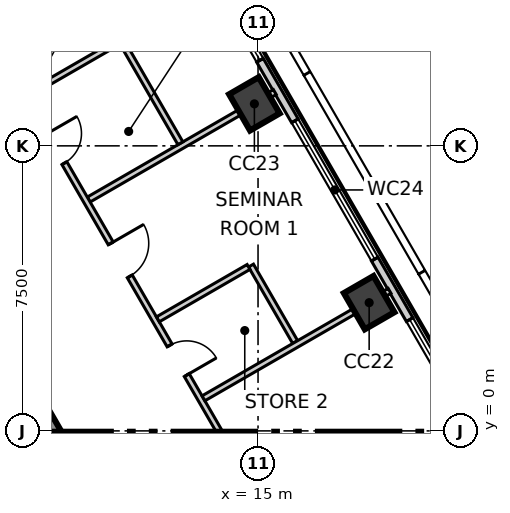
"""IFC4 building model, lengths in metres.
Left out: names, types, materials, properties, quantities, classifications, styles, units other than length and angle.
Written with IfcOpenShell. Run it as: python <this file> out.ifc"""

import sys

from ifc_helpers import new_model, si_unit, direction, frame, frame_2d, origin, origin_2d, place, context, subcontext, project, spatial, polyline, rectangle, outline, extrude, element, fill, save


model = new_model("IFC4")
c1 = context("Model", 3, precision=1e-05, world=origin(), true_north=direction((0.0, 1.0)))
c2 = subcontext(c1, "Body", "Model", "MODEL_VIEW")
j1 = project(units=[si_unit("LENGTHUNIT", "METRE"), si_unit("PLANEANGLEUNIT", "RADIAN")], contexts=[c1])
p1 = place(None, origin())
s1 = spatial("IfcSite", under=j1, at=p1, CompositionType="ELEMENT")
p2 = place(p1, origin())
s2 = spatial("IfcBuilding", under=s1, at=p2, CompositionType="ELEMENT")
p3 = place(p2, frame((0.0, 0.0, 215.3)))
s3 = spatial("IfcBuildingStorey", under=s2, at=p3, CompositionType="ELEMENT", Elevation=215.3)
p4 = place(p3, frame((12.413, -5.2, -0.3), z_axis=(0.0, 0.0, 1.0), x_axis=(-0.500011533395, 0.866018744874, 0.0)))
e1 = element("IfcWall", 1, at=p4, inside=s3, PredefinedType="SHEAR", context=c2, shape_type="SweptSolid", body=[
    extrude(outline(polyline([(-0.202, -0.35), (1.782, -0.35), (3.766, -0.35), (5.75, -0.35), (7.734, -0.35), (9.718, -0.35), (11.702, -0.35), (13.686, -0.35), (15.67, -0.35), (17.654, -0.35), (19.638, -0.35), (21.622, -0.35), (21.218, 0.35), (19.307, 0.35), (17.397, 0.35), (15.486, 0.35), (13.576, 0.35), (11.665, 0.35), (9.755, 0.35), (7.844, 0.35), (5.934, 0.35), (4.023, 0.35), (2.113, 0.35), (0.202, 0.35), (-0.202, -0.35)])), origin(), (0.0, 0.0, 1.0), 4.0),
])
p5 = place(p4, frame((4.055, 0.0, 0.3)))
e2 = element("IfcOpeningElement", 2, at=p5, cuts=e1, PredefinedType="OPENING", context=c2, shape_type="SweptSolid", body=[
    extrude(rectangle(XDim=0.9, YDim=2.1, at=frame_2d((0.45, 1.05))), frame((0.0, 0.36, 0.0), z_axis=(0.0, -1.0, 0.0), x_axis=(1.0, 0.0, 0.0)), (0.0, 0.0, 1.0), 0.72),
])
p6 = place(p4, frame((16.465, 0.0, 0.3)))
e3 = element("IfcOpeningElement", 3, at=p6, cuts=e1, PredefinedType="OPENING", context=c2, shape_type="SweptSolid", body=[
    extrude(rectangle(XDim=0.9, YDim=2.1, at=frame_2d((0.45, 1.05))), frame((0.0, 0.36, 0.0), z_axis=(0.0, -1.0, 0.0), x_axis=(1.0, 0.0, 0.0)), (0.0, 0.0, 1.0), 0.72),
])
for number, where, z_axis, x_axis in (
    (4, (17.924, 3.374, -0.3), (0.0, 0.0, 1.0), (-0.5, 0.866, 0.0)),
    (5, (14.904, 8.605, -0.3), (0.0, 0.0, 1.0), (-0.5, 0.866, 0.0)),
):
    element("IfcColumn", number, at=place(p3, frame(where, z_axis=z_axis, x_axis=x_axis)), inside=s3, PredefinedType="COLUMN", context=c2, shape_type="SweptSolid", body=[
        extrude(rectangle(XDim=1.1, YDim=0.9, at=origin_2d()), origin(), (0.0, 0.0, 1.0), 4.0),
    ])
p7 = place(p3, frame((28.243, -13.098, 0.0), z_axis=(0.0, 0.0, 1.0), x_axis=(-0.500001688958, 0.866024428662, 0.0)))
e6 = element("IfcWall", 6, at=p7, inside=s3, PredefinedType="ELEMENTEDWALL", context=c2, shape_type="SweptSolid", body=[
    extrude(rectangle(XDim=50.909, YDim=0.2, at=frame_2d((25.455, 0.0))), origin(), (0.0, 0.0, 1.0), 3.7),
])
p8 = place(p7, frame((2.223, 0.0, 0.9)))
e7 = element("IfcOpeningElement", 7, at=p8, cuts=e6, PredefinedType="OPENING", context=c2, shape_type="SweptSolid", body=[
    extrude(rectangle(XDim=4.2, YDim=2.5, at=frame_2d((2.1, 1.25))), frame((0.0, 0.11, 0.0), z_axis=(0.0, -1.0, 0.0), x_axis=(1.0, 0.0, 0.0)), (0.0, 0.0, 1.0), 0.22),
])
p9 = place(p7, frame((8.263, 0.0, 0.9)))
e8 = element("IfcOpeningElement", 8, at=p9, cuts=e6, PredefinedType="OPENING", context=c2, shape_type="SweptSolid", body=[
    extrude(rectangle(XDim=4.2, YDim=2.5, at=frame_2d((2.1, 1.25))), frame((0.0, 0.11, 0.0), z_axis=(0.0, -1.0, 0.0), x_axis=(1.0, 0.0, 0.0)), (0.0, 0.0, 1.0), 0.22),
])
p10 = place(p7, frame((14.304, 0.0, 0.9)))
e9 = element("IfcOpeningElement", 9, at=p10, cuts=e6, PredefinedType="OPENING", context=c2, shape_type="SweptSolid", body=[
    extrude(rectangle(XDim=4.2, YDim=2.5, at=frame_2d((2.1, 1.25))), frame((0.0, 0.11, 0.0), z_axis=(0.0, -1.0, 0.0), x_axis=(1.0, 0.0, 0.0)), (0.0, 0.0, 1.0), 0.22),
])
p11 = place(p7, frame((20.345, 0.0, 0.9)))
e10 = element("IfcOpeningElement", 10, at=p11, cuts=e6, PredefinedType="OPENING", context=c2, shape_type="SweptSolid", body=[
    extrude(rectangle(XDim=4.2, YDim=2.5, at=frame_2d((2.1, 1.25))), frame((0.0, 0.11, 0.0), z_axis=(0.0, -1.0, 0.0), x_axis=(1.0, 0.0, 0.0)), (0.0, 0.0, 1.0), 0.22),
])
p12 = place(p7, frame((26.385, 0.0, 0.9)))
e11 = element("IfcOpeningElement", 11, at=p12, cuts=e6, PredefinedType="OPENING", context=c2, shape_type="SweptSolid", body=[
    extrude(rectangle(XDim=4.2, YDim=2.5, at=frame_2d((2.1, 1.25))), frame((0.0, 0.11, 0.0), z_axis=(0.0, -1.0, 0.0), x_axis=(1.0, 0.0, 0.0)), (0.0, 0.0, 1.0), 0.22),
])
p13 = place(p7, frame((32.426, 0.0, 0.9)))
e12 = element("IfcOpeningElement", 12, at=p13, cuts=e6, PredefinedType="OPENING", context=c2, shape_type="SweptSolid", body=[
    extrude(rectangle(XDim=4.2, YDim=2.5, at=frame_2d((2.1, 1.25))), frame((0.0, 0.11, 0.0), z_axis=(0.0, -1.0, 0.0), x_axis=(1.0, 0.0, 0.0)), (0.0, 0.0, 1.0), 0.22),
])
p14 = place(p7, frame((38.466, 0.0, 0.9)))
e13 = element("IfcOpeningElement", 13, at=p14, cuts=e6, PredefinedType="OPENING", context=c2, shape_type="SweptSolid", body=[
    extrude(rectangle(XDim=4.2, YDim=2.5, at=frame_2d((2.1, 1.25))), frame((0.0, 0.11, 0.0), z_axis=(0.0, -1.0, 0.0), x_axis=(1.0, 0.0, 0.0)), (0.0, 0.0, 1.0), 0.22),
])
p15 = place(p7, frame((44.507, 0.0, 0.9)))
e14 = element("IfcOpeningElement", 14, at=p15, cuts=e6, PredefinedType="OPENING", context=c2, shape_type="SweptSolid", body=[
    extrude(rectangle(XDim=4.2, YDim=2.5, at=frame_2d((2.1, 1.25))), frame((0.0, 0.11, 0.0), z_axis=(0.0, -1.0, 0.0), x_axis=(1.0, 0.0, 0.0)), (0.0, 0.0, 1.0), 0.22),
])
p16 = place(p3, frame((10.544, 6.087, 0.0), z_axis=(0.0, 0.0, 1.0), x_axis=(0.865959810878, 0.500113593041, 0.0)))
e15 = element("IfcWall", 15, at=p16, inside=s3, PredefinedType="PARTITIONING", context=c2, shape_type="SweptSolid", body=[
    extrude(rectangle(XDim=5.655, YDim=0.15, at=frame_2d((2.828, 0.0))), origin(), (0.0, 0.0, 1.0), 3.2),
])
p17 = place(p3, frame((0.075, 24.07, 0.0), z_axis=(0.0, 0.0, 1.0), x_axis=(0.500006834213, -0.866021458014, 0.0)))
e16 = element("IfcWall", 16, at=p17, inside=s3, PredefinedType="PARTITIONING", context=c2, shape_type="SweptSolid", body=[
    extrude(rectangle(XDim=41.616, YDim=0.15, at=frame_2d((20.808, 0.0))), origin(), (0.0, 0.0, 1.0), 3.7),
])
p18 = place(p17, frame((33.715, 0.0, 0.0)))
e17 = element("IfcOpeningElement", 17, at=p18, cuts=e16, PredefinedType="OPENING", context=c2, shape_type="SweptSolid", body=[
    extrude(rectangle(XDim=1.1, YDim=2.1, at=frame_2d((0.55, 1.05))), frame((0.0, 0.085, 0.0), z_axis=(0.0, -1.0, 0.0), x_axis=(1.0, 0.0, 0.0)), (0.0, 0.0, 1.0), 0.17),
])
p19 = place(p17, frame((22.098, 0.0, 0.0)))
e18 = element("IfcOpeningElement", 18, at=p19, cuts=e16, PredefinedType="OPENING", context=c2, shape_type="SweptSolid", body=[
    extrude(rectangle(XDim=1.0, YDim=2.1, at=frame_2d((0.5, 1.05))), frame((0.0, 0.085, 0.0), z_axis=(0.0, -1.0, 0.0), x_axis=(1.0, 0.0, 0.0)), (0.0, 0.0, 1.0), 0.17),
])
p20 = place(p17, frame((25.198, 0.0, 0.0)))
e19 = element("IfcOpeningElement", 19, at=p20, cuts=e16, PredefinedType="OPENING", context=c2, shape_type="SweptSolid", body=[
    extrude(rectangle(XDim=0.9, YDim=2.1, at=frame_2d((0.45, 1.05))), frame((0.0, 0.085, 0.0), z_axis=(0.0, -1.0, 0.0), x_axis=(1.0, 0.0, 0.0)), (0.0, 0.0, 1.0), 0.17),
])
p21 = place(p17, frame((9.858, 0.0, 0.0)))
e20 = element("IfcOpeningElement", 20, at=p21, cuts=e16, PredefinedType="OPENING", context=c2, shape_type="SweptSolid", body=[
    extrude(rectangle(XDim=1.1, YDim=2.1, at=frame_2d((0.55, 1.05))), frame((0.0, 0.085, 0.0), z_axis=(0.0, -1.0, 0.0), x_axis=(1.0, 0.0, 0.0)), (0.0, 0.0, 1.0), 0.17),
])
p22 = place(p17, frame((18.758, 0.0, 0.0)))
e21 = element("IfcOpeningElement", 21, at=p22, cuts=e16, PredefinedType="OPENING", context=c2, shape_type="SweptSolid", body=[
    extrude(rectangle(XDim=0.9, YDim=2.1, at=frame_2d((0.45, 1.05))), frame((0.0, 0.085, 0.0), z_axis=(0.0, -1.0, 0.0), x_axis=(1.0, 0.0, 0.0)), (0.0, 0.0, 1.0), 0.17),
])
p23 = place(p17, frame((15.558, 0.0, 0.0)))
e22 = element("IfcOpeningElement", 22, at=p23, cuts=e16, PredefinedType="OPENING", context=c2, shape_type="SweptSolid", body=[
    extrude(rectangle(XDim=0.9, YDim=2.1, at=frame_2d((0.45, 1.05))), frame((0.0, 0.085, 0.0), z_axis=(0.0, -1.0, 0.0), x_axis=(1.0, 0.0, 0.0)), (0.0, 0.0, 1.0), 0.17),
])
p24 = place(p17, frame((12.658, 0.0, 0.0)))
e23 = element("IfcOpeningElement", 23, at=p24, cuts=e16, PredefinedType="OPENING", context=c2, shape_type="SweptSolid", body=[
    extrude(rectangle(XDim=1.0, YDim=2.1, at=frame_2d((0.5, 1.05))), frame((0.0, 0.085, 0.0), z_axis=(0.0, -1.0, 0.0), x_axis=(1.0, 0.0, 0.0)), (0.0, 0.0, 1.0), 0.17),
])
p25 = place(p17, frame((3.776, 0.0, 0.0)))
e24 = element("IfcOpeningElement", 24, at=p25, cuts=e16, PredefinedType="OPENING", context=c2, shape_type="SweptSolid", body=[
    extrude(rectangle(XDim=1.1, YDim=2.1, at=frame_2d((0.55, 1.05))), frame((0.0, 0.085, 0.0), z_axis=(0.0, -1.0, 0.0), x_axis=(1.0, 0.0, 0.0)), (0.0, 0.0, 1.0), 0.17),
])
p26 = place(p3, frame((8.595, 15.124, 0.0), z_axis=(0.0, 0.0, 1.0), x_axis=(0.499970334739, -0.866042530354, 0.0)))
e25 = element("IfcWall", 25, at=p26, inside=s3, PredefinedType="PARTITIONING", context=c2, shape_type="SweptSolid", body=[
    extrude(rectangle(XDim=8.725, YDim=0.15, at=frame_2d((4.362, 0.0))), origin(), (0.0, 0.0, 1.0), 3.7),
])
p27 = place(p3, frame((14.815, 4.35, 0.0), z_axis=(0.0, 0.0, 1.0), x_axis=(0.499934593286, -0.866063163075, 0.0)))
e26 = element("IfcWall", 26, at=p27, inside=s3, PredefinedType="PARTITIONING", context=c2, shape_type="SweptSolid", body=[
    extrude(rectangle(XDim=2.324, YDim=0.15, at=frame_2d((1.162, 0.0))), origin(), (0.0, 0.0, 1.0), 3.7),
])
p28 = place(p3, frame((8.944, 8.859, 0.0), z_axis=(0.0, 0.0, 1.0), x_axis=(0.866080816704, 0.499904009723, 0.0)))
e27 = element("IfcWall", 27, at=p28, inside=s3, PredefinedType="PARTITIONING", context=c2, shape_type="SweptSolid", body=[
    extrude(rectangle(XDim=2.755, YDim=0.15, at=frame_2d((1.377, 0.0))), origin(), (0.0, 0.0, 1.0), 3.7),
])
p29 = place(p3, frame((12.364, 2.935, 0.0), z_axis=(0.0, 0.0, 1.0), x_axis=(0.865965703354, 0.500103389924, 0.0)))
e28 = element("IfcWall", 28, at=p29, inside=s3, PredefinedType="PARTITIONING", context=c2, shape_type="SweptSolid", body=[
    extrude(rectangle(XDim=2.755, YDim=0.15, at=frame_2d((1.378, 0.0))), origin(), (0.0, 0.0, 1.0), 3.7),
])
p30 = place(p3, frame((13.564, 0.857, 0.0), z_axis=(0.0, 0.0, 1.0), x_axis=(0.866034596441, 0.499984077514, 0.0)))
e29 = element("IfcWall", 29, at=p30, inside=s3, PredefinedType="PARTITIONING", context=c2, shape_type="SweptSolid", body=[
    extrude(rectangle(XDim=5.655, YDim=0.15, at=frame_2d((2.827, 0.0))), origin(), (0.0, 0.0, 1.0), 3.7),
])
p31 = place(p10, origin())
e30 = element("IfcWindow", 30, at=p31, inside=s3, PartitioningType="SINGLE_PANEL", PredefinedType="WINDOW", context=c2, shape_type="SweptSolid", body=[
    extrude(rectangle(XDim=4.2, YDim=2.5, at=frame_2d((2.1, 1.25))), frame((0.0, 0.03, 0.0), z_axis=(0.0, -1.0, 0.0), x_axis=(1.0, 0.0, 0.0)), (0.0, 0.0, 1.0), 0.06),
])
fill(e9, e30)
p32 = place(p11, origin())
e31 = element("IfcWindow", 31, at=p32, inside=s3, PartitioningType="SINGLE_PANEL", PredefinedType="WINDOW", context=c2, shape_type="SweptSolid", body=[
    extrude(rectangle(XDim=4.2, YDim=2.5, at=frame_2d((2.1, 1.25))), frame((0.0, 0.03, 0.0), z_axis=(0.0, -1.0, 0.0), x_axis=(1.0, 0.0, 0.0)), (0.0, 0.0, 1.0), 0.06),
])
fill(e10, e31)
p33 = place(p12, origin())
e32 = element("IfcWindow", 32, at=p33, inside=s3, PartitioningType="SINGLE_PANEL", PredefinedType="WINDOW", context=c2, shape_type="SweptSolid", body=[
    extrude(rectangle(XDim=4.2, YDim=2.5, at=frame_2d((2.1, 1.25))), frame((0.0, 0.03, 0.0), z_axis=(0.0, -1.0, 0.0), x_axis=(1.0, 0.0, 0.0)), (0.0, 0.0, 1.0), 0.06),
])
fill(e11, e32)
p34 = place(p19, origin())
e33 = element("IfcDoor", 33, at=p34, inside=s3, OperationType="SINGLE_SWING_RIGHT", PredefinedType="DOOR", context=c2, shape_type="SweptSolid", body=[
    extrude(rectangle(XDim=1.0, YDim=2.1, at=frame_2d((0.5, 1.05))), frame((0.0, 0.025, 0.0), z_axis=(0.0, -1.0, 0.0), x_axis=(1.0, 0.0, 0.0)), (0.0, 0.0, 1.0), 0.05),
])
fill(e18, e33)
p35 = place(p20, origin())
e34 = element("IfcDoor", 34, at=p35, inside=s3, OperationType="SINGLE_SWING_LEFT", PredefinedType="DOOR", context=c2, shape_type="SweptSolid", body=[
    extrude(rectangle(XDim=0.9, YDim=2.1, at=frame_2d((0.45, 1.05))), frame((0.0, 0.025, 0.0), z_axis=(0.0, -1.0, 0.0), x_axis=(1.0, 0.0, 0.0)), (0.0, 0.0, 1.0), 0.05),
])
fill(e19, e34)
p36 = place(p22, origin())
e35 = element("IfcDoor", 35, at=p36, inside=s3, OperationType="SINGLE_SWING_RIGHT", PredefinedType="DOOR", context=c2, shape_type="SweptSolid", body=[
    extrude(rectangle(XDim=0.9, YDim=2.1, at=frame_2d((0.45, 1.05))), frame((0.0, 0.025, 0.0), z_axis=(0.0, -1.0, 0.0), x_axis=(1.0, 0.0, 0.0)), (0.0, 0.0, 1.0), 0.05),
])
fill(e21, e35)
save(model, sys.argv[1])
